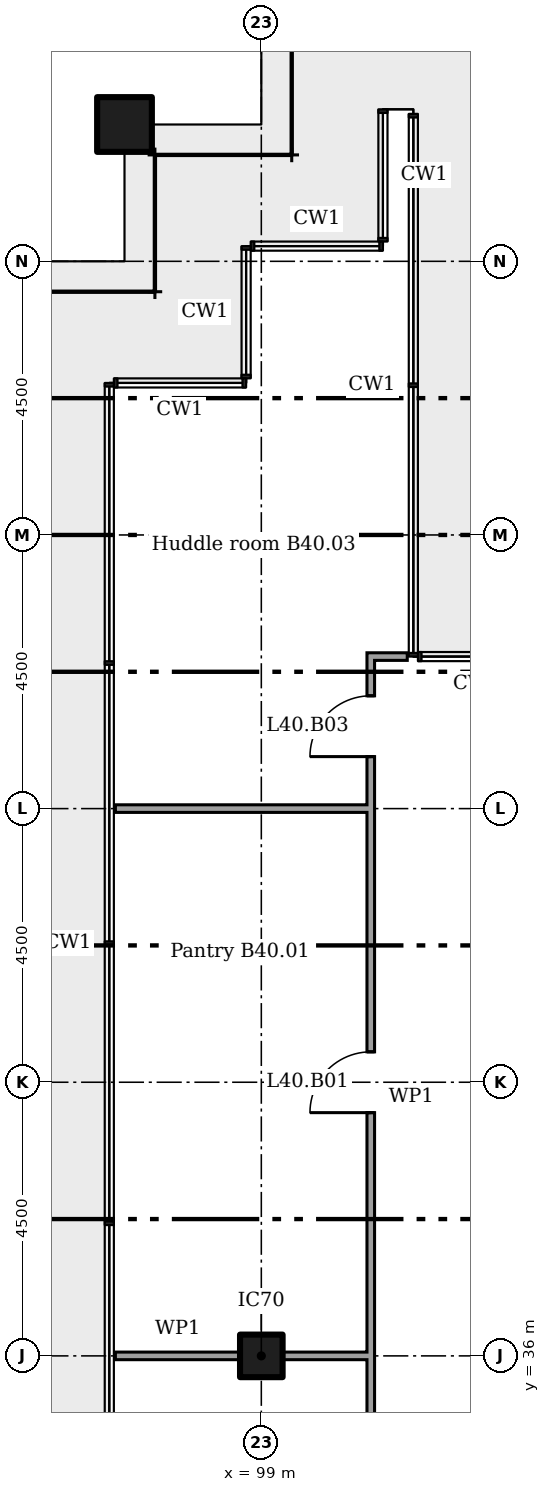
"""IFC4 building model, lengths in metres.
Left out: names, types, materials, properties, quantities, classifications, styles, units other than length and angle.
Written with IfcOpenShell. Run it as: python <this file> out.ifc"""

import sys

from ifc_helpers import new_model, si_unit, direction, frame, frame_2d, origin, origin_2d, place, context, subcontext, project, spatial, rectangle, extrude, element, fill, save


model = new_model("IFC4")
c1 = context("Model", 3, precision=1e-05, world=origin(), true_north=direction((0.0, 1.0)))
c2 = subcontext(c1, "Body", "Model", "MODEL_VIEW")
j1 = project(units=[si_unit("LENGTHUNIT", "METRE"), si_unit("PLANEANGLEUNIT", "RADIAN")], contexts=[c1])
p1 = place(None, origin())
s1 = spatial("IfcSite", under=j1, at=p1, CompositionType="ELEMENT")
p2 = place(p1, origin())
s2 = spatial("IfcBuilding", under=s1, at=p2, CompositionType="ELEMENT")
p3 = place(p2, frame((0.0, 0.0, 161.8)))
s3 = spatial("IfcBuildingStorey", under=s2, at=p3, CompositionType="ELEMENT", Elevation=161.8)
p4 = place(p3, frame((96.75, 56.25, 0.0)))
e1 = element("IfcColumn", 1, at=p4, inside=s3, PredefinedType="COLUMN", context=c2, shape_type="SweptSolid", body=[
    extrude(rectangle(XDim=0.9, YDim=0.9, at=origin_2d()), origin(), (0.0, 0.0, 1.0), 3.6),
])
p5 = place(p3, frame((99.0, 36.0, 0.0)))
e2 = element("IfcColumn", 2, at=p5, inside=s3, PredefinedType="COLUMN", context=c2, shape_type="SweptSolid", body=[
    extrude(rectangle(XDim=0.7, YDim=0.7, at=origin_2d()), origin(), (0.0, 0.0, 1.0), 3.6),
])
p6 = place(p3, frame((96.6, 36.0, 0.0)))
e3 = element("IfcWall", 3, at=p6, inside=s3, PredefinedType="PARTITIONING", context=c2, shape_type="SweptSolid", body=[
    extrude(rectangle(XDim=2.05, YDim=0.125, at=frame_2d((1.025, 0.0))), origin(), (0.0, 0.0, 1.0), 2.842),
])
p7 = place(p3, frame((99.35, 36.0, 0.0)))
e4 = element("IfcWall", 4, at=p7, inside=s3, PredefinedType="PARTITIONING", context=c2, shape_type="SweptSolid", body=[
    extrude(rectangle(XDim=1.45, YDim=0.125, at=frame_2d((0.725, 0.0))), origin(), (0.0, 0.0, 1.0), 2.842),
])
p8 = place(p3, frame((96.6, 45.0, 0.0)))
e5 = element("IfcWall", 5, at=p8, inside=s3, PredefinedType="PARTITIONING", context=c2, shape_type="SweptSolid", body=[
    extrude(rectangle(XDim=4.2, YDim=0.125, at=frame_2d((2.1, 0.0))), origin(), (0.0, 0.0, 1.0), 2.851),
])
p9 = place(p3, frame((100.738, 47.5, 0.0)))
e6 = element("IfcWall", 6, at=p9, inside=s3, PredefinedType="PARTITIONING", context=c2, shape_type="SweptSolid", body=[
    extrude(rectangle(XDim=0.662, YDim=0.125, at=frame_2d((0.331, 0.0))), origin(), (0.0, 0.0, 1.0), 3.45),
])
p10 = place(p3, frame((100.8, 33.062, 0.0), z_axis=(0.0, 0.0, 1.0), x_axis=(0.0, 1.0, 0.0)))
e7 = element("IfcWall", 7, at=p10, inside=s3, PredefinedType="PARTITIONING", context=c2, shape_type="SweptSolid", body=[
    extrude(rectangle(XDim=14.375, YDim=0.125, at=frame_2d((7.188, 0.0))), origin(), (0.0, 0.0, 1.0), 3.45),
])
p11 = place(p10, frame((6.938, 0.0, 0.0)))
e8 = element("IfcOpeningElement", 8, at=p11, cuts=e7, PredefinedType="OPENING", context=c2, shape_type="SweptSolid", body=[
    extrude(rectangle(XDim=1.0, YDim=2.1, at=frame_2d((0.5, 1.05))), frame((0.0, 0.073, 0.0), z_axis=(0.0, -1.0, 0.0), x_axis=(1.0, 0.0, 0.0)), (0.0, 0.0, 1.0), 0.145),
])
p12 = place(p10, frame((12.792, 0.0, 0.0)))
e9 = element("IfcOpeningElement", 9, at=p12, cuts=e7, PredefinedType="OPENING", context=c2, shape_type="SweptSolid", body=[
    extrude(rectangle(XDim=1.0, YDim=2.1, at=frame_2d((0.5, 1.05))), frame((0.0, 0.073, 0.0), z_axis=(0.0, -1.0, 0.0), x_axis=(1.0, 0.0, 0.0)), (0.0, 0.0, 1.0), 0.145),
])
p13 = place(p11, origin())
e10 = element("IfcDoor", 10, at=p13, inside=s3, OperationType="SINGLE_SWING_RIGHT", PredefinedType="DOOR", context=c2, shape_type="SweptSolid", body=[
    extrude(rectangle(XDim=1.0, YDim=2.1, at=frame_2d((0.5, 1.05))), frame((0.0, 0.025, 0.0), z_axis=(0.0, -1.0, 0.0), x_axis=(1.0, 0.0, 0.0)), (0.0, 0.0, 1.0), 0.05),
])
fill(e8, e10)
p14 = place(p12, origin())
e11 = element("IfcDoor", 11, at=p14, inside=s3, OperationType="SINGLE_SWING_RIGHT", PredefinedType="DOOR", context=c2, shape_type="SweptSolid", body=[
    extrude(rectangle(XDim=1.0, YDim=2.1, at=frame_2d((0.5, 1.05))), frame((0.0, 0.025, 0.0), z_axis=(0.0, -1.0, 0.0), x_axis=(1.0, 0.0, 0.0)), (0.0, 0.0, 1.0), 0.05),
])
fill(e9, e11)
save(model, sys.argv[1])
